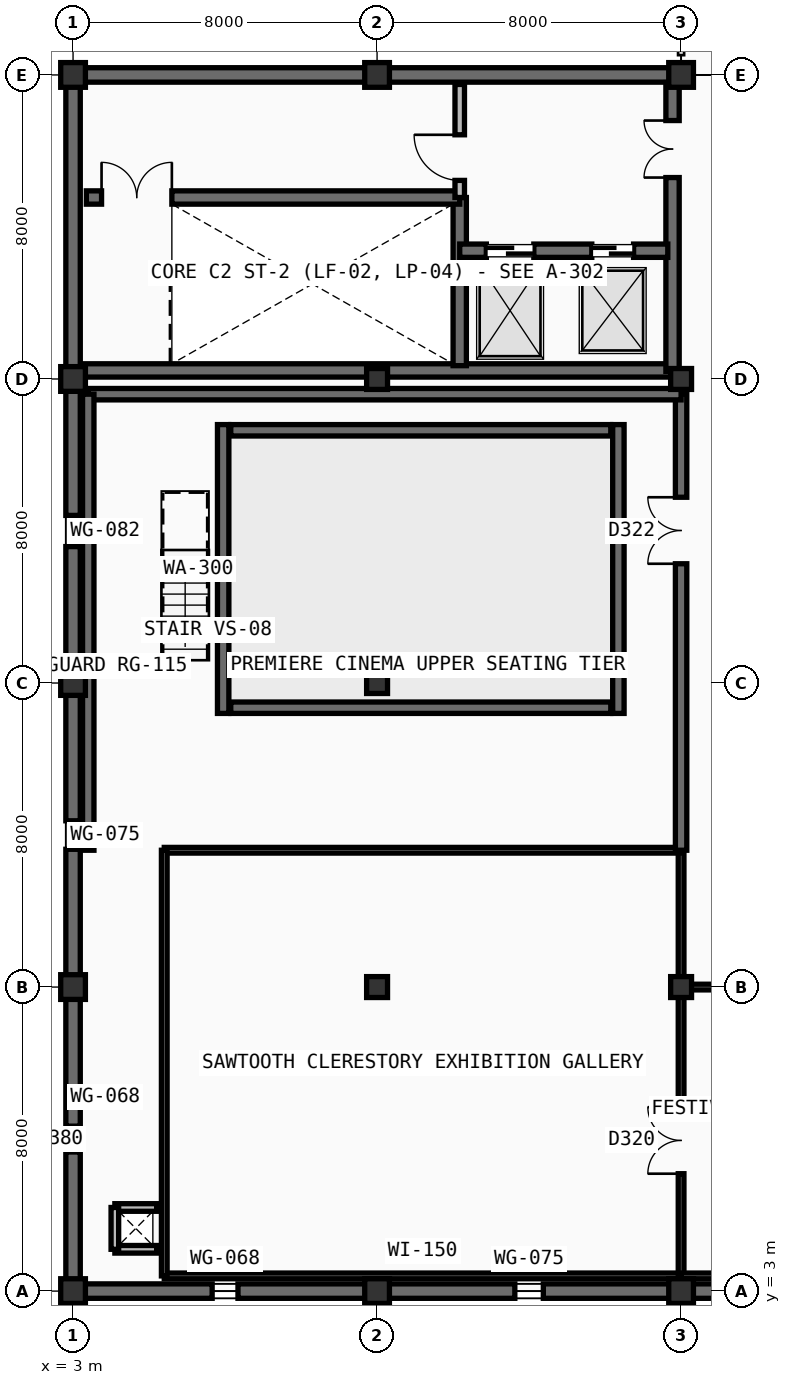
"""IFC4 building model, lengths in metres.
Left out: names, types, materials, properties, quantities, classifications, styles, units other than length and angle.
Written with IfcOpenShell. Run it as: python <this file> out.ifc"""

import sys

from ifc_helpers import new_model, si_unit, direction, frame, frame_2d, origin, origin_2d, place, context, subcontext, project, spatial, polyline, rectangle, outline, extrude, element, fill, save


model = new_model("IFC4")
c1 = context("Model", 3, precision=1e-05, world=origin(), true_north=direction((0.0, 1.0)))
c2 = subcontext(c1, "Body", "Model", "MODEL_VIEW")
j1 = project(units=[si_unit("LENGTHUNIT", "METRE"), si_unit("PLANEANGLEUNIT", "RADIAN")], contexts=[c1])
p1 = place(None, origin())
s1 = spatial("IfcSite", under=j1, at=p1, CompositionType="ELEMENT")
p2 = place(p1, origin())
s2 = spatial("IfcBuilding", under=s1, at=p2, CompositionType="ELEMENT")
p3 = place(p2, frame((0.0, 0.0, 27.9)))
s3 = spatial("IfcBuildingStorey", under=s2, at=p3, CompositionType="ELEMENT", Elevation=27.9)
for number, where, z_axis, x_axis in (
    (1, (3.0, 3.0, 0.0), (0.0, 0.0, 1.0), (1.0, 0.0, 0.0)),
    (2, (3.0, 11.0, 0.0), (0.0, 0.0, 1.0), (1.0, 0.0, 0.0)),
    (3, (3.0, 19.0, 0.0), (0.0, 0.0, 1.0), (1.0, 0.0, 0.0)),
    (4, (3.0, 27.0, 0.0), (0.0, 0.0, 1.0), (1.0, 0.0, 0.0)),
    (5, (3.0, 35.0, 0.0), (0.0, 0.0, 1.0), (1.0, 0.0, 0.0)),
    (6, (11.0, 3.0, 0.0), (0.0, 0.0, 1.0), (1.0, 0.0, 0.0)),
):
    element("IfcColumn", number, at=place(p3, frame(where, z_axis=z_axis, x_axis=x_axis)), inside=s3, PredefinedType="COLUMN", context=c2, shape_type="SweptSolid", body=[
        extrude(rectangle(XDim=0.65, YDim=0.65, at=origin_2d()), origin(), (0.0, 0.0, 1.0), 4.8),
    ])
for number, where, z_axis, x_axis in (
    (7, (11.0, 11.0, 0.0), (0.0, 0.0, 1.0), (1.0, 0.0, 0.0)),
    (8, (11.0, 19.0, 0.0), (0.0, 0.0, 1.0), (1.0, 0.0, 0.0)),
    (9, (11.0, 27.0, 0.0), (0.0, 0.0, 1.0), (1.0, 0.0, 0.0)),
):
    element("IfcColumn", number, at=place(p3, frame(where, z_axis=z_axis, x_axis=x_axis)), inside=s3, PredefinedType="COLUMN", context=c2, shape_type="SweptSolid", body=[
        extrude(rectangle(XDim=0.55, YDim=0.55, at=origin_2d()), origin(), (0.0, 0.0, 1.0), 4.8),
    ])
for number, where, z_axis, x_axis in (
    (10, (11.0, 35.0, 0.0), (0.0, 0.0, 1.0), (1.0, 0.0, 0.0)),
    (11, (19.0, 3.0, 0.0), (0.0, 0.0, 1.0), (1.0, 0.0, 0.0)),
):
    element("IfcColumn", number, at=place(p3, frame(where, z_axis=z_axis, x_axis=x_axis)), inside=s3, PredefinedType="COLUMN", context=c2, shape_type="SweptSolid", body=[
        extrude(rectangle(XDim=0.65, YDim=0.65, at=origin_2d()), origin(), (0.0, 0.0, 1.0), 4.8),
    ])
for number, where, z_axis, x_axis in (
    (12, (19.0, 11.0, 0.0), (0.0, 0.0, 1.0), (1.0, 0.0, 0.0)),
    (13, (19.0, 27.0, 0.0), (0.0, 0.0, 1.0), (1.0, 0.0, 0.0)),
):
    element("IfcColumn", number, at=place(p3, frame(where, z_axis=z_axis, x_axis=x_axis)), inside=s3, PredefinedType="COLUMN", context=c2, shape_type="SweptSolid", body=[
        extrude(rectangle(XDim=0.55, YDim=0.55, at=origin_2d()), origin(), (0.0, 0.0, 1.0), 4.8),
    ])
p4 = place(p3, frame((19.0, 35.0, 0.0), z_axis=(0.0, 0.0, 1.0), x_axis=(1.0, 0.0, 0.0)))
e14 = element("IfcColumn", 14, at=p4, inside=s3, PredefinedType="COLUMN", context=c2, shape_type="SweptSolid", body=[
    extrude(rectangle(XDim=0.65, YDim=0.65, at=origin_2d()), origin(), (0.0, 0.0, 1.0), 4.8),
])
for number, where, z_axis, x_axis in (
    (15, (6.95, 18.2, 0.0), (0.0, 0.0, 1.0), (0.0, 1.0, 0.0)),
    (16, (17.35, 18.2, 0.0), (0.0, 0.0, 1.0), (0.0, 1.0, 0.0)),
):
    element("IfcWall", number, at=place(p3, frame(where, z_axis=z_axis, x_axis=x_axis)), inside=s3, PredefinedType="SHEAR", context=c2, shape_type="SweptSolid", body=[
        extrude(outline(polyline([(0.0, 0.0), (7.6, 0.0), (7.6, 2.02), (0.0, 0.52), (0.0, 0.0)])), frame((0.0, 0.15, 0.0), z_axis=(0.0, -1.0, 0.0), x_axis=(1.0, 0.0, 0.0)), (0.0, 0.0, 1.0), 0.3),
    ])
p5 = place(p3, frame((7.15, 25.65, 0.0), z_axis=(0.0, 0.0, 1.0), x_axis=(1.0, 0.0, 0.0)))
e17 = element("IfcWall", 17, at=p5, inside=s3, PredefinedType="SHEAR", context=c2, shape_type="SweptSolid", body=[
    extrude(rectangle(XDim=10.0, YDim=0.3, at=frame_2d((5.0, 0.0))), origin(), (0.0, 0.0, 1.0), 2.02),
])
p6 = place(p3, frame((7.15, 18.35, 0.0), z_axis=(0.0, 0.0, 1.0), x_axis=(1.0, 0.0, 0.0)))
e18 = element("IfcWall", 18, at=p6, inside=s3, PredefinedType="SHEAR", context=c2, shape_type="SweptSolid", body=[
    extrude(rectangle(XDim=10.0, YDim=0.3, at=frame_2d((5.0, 0.0))), origin(), (0.0, 0.0, 1.0), 0.52),
])
p7 = place(p3, frame((3.0, 3.0, 0.0), z_axis=(0.0, 0.0, 1.0), x_axis=(0.0, 1.0, 0.0)))
e19 = element("IfcWall", 19, at=p7, inside=s3, PredefinedType="SOLIDWALL", context=c2, shape_type="SweptSolid", body=[
    extrude(rectangle(XDim=8.0, YDim=0.38, at=frame_2d((4.0, 0.0))), origin(), (0.0, 0.0, 1.0), 4.8),
])
p8 = place(p7, frame((3.66, 0.0, 1.05)))
e20 = element("IfcOpeningElement", 20, at=p8, cuts=e19, PredefinedType="OPENING", context=c2, shape_type="SweptSolid", body=[
    extrude(rectangle(XDim=0.68, YDim=1.15, at=frame_2d((0.34, 0.575))), frame((0.0, 0.2, 0.0), z_axis=(0.0, -1.0, 0.0), x_axis=(1.0, 0.0, 0.0)), (0.0, 0.0, 1.0), 0.4),
])
p9 = place(p3, frame((3.0, 11.0, 0.0), z_axis=(0.0, 0.0, 1.0), x_axis=(0.0, 1.0, 0.0)))
e21 = element("IfcWall", 21, at=p9, inside=s3, PredefinedType="SOLIDWALL", context=c2, shape_type="SweptSolid", body=[
    extrude(rectangle(XDim=8.0, YDim=0.38, at=frame_2d((4.0, 0.0))), origin(), (0.0, 0.0, 1.0), 4.8),
])
p10 = place(p9, frame((3.625, 0.0, 1.05)))
e22 = element("IfcOpeningElement", 22, at=p10, cuts=e21, PredefinedType="OPENING", context=c2, shape_type="SweptSolid", body=[
    extrude(rectangle(XDim=0.75, YDim=1.3, at=frame_2d((0.375, 0.65))), frame((0.0, 0.2, 0.0), z_axis=(0.0, -1.0, 0.0), x_axis=(1.0, 0.0, 0.0)), (0.0, 0.0, 1.0), 0.4),
])
p11 = place(p3, frame((3.0, 19.0, 0.0), z_axis=(0.0, 0.0, 1.0), x_axis=(0.0, 1.0, 0.0)))
e23 = element("IfcWall", 23, at=p11, inside=s3, PredefinedType="SOLIDWALL", context=c2, shape_type="SweptSolid", body=[
    extrude(rectangle(XDim=8.0, YDim=0.38, at=frame_2d((4.0, 0.0))), origin(), (0.0, 0.0, 1.0), 4.8),
])
p12 = place(p11, frame((3.59, 0.0, 1.05)))
e24 = element("IfcOpeningElement", 24, at=p12, cuts=e23, PredefinedType="OPENING", context=c2, shape_type="SweptSolid", body=[
    extrude(rectangle(XDim=0.82, YDim=1.38, at=frame_2d((0.41, 0.69))), frame((0.0, 0.2, 0.0), z_axis=(0.0, -1.0, 0.0), x_axis=(1.0, 0.0, 0.0)), (0.0, 0.0, 1.0), 0.4),
])
for number, where, z_axis, x_axis in (
    (25, (3.0, 27.0, 0.0), (0.0, 0.0, 1.0), (0.0, 1.0, 0.0)),
    (26, (3.0, 35.0, 0.0), (0.0, 0.0, 1.0), (1.0, 0.0, 0.0)),
    (27, (11.0, 35.0, 0.0), (0.0, 0.0, 1.0), (1.0, 0.0, 0.0)),
):
    element("IfcWall", number, at=place(p3, frame(where, z_axis=z_axis, x_axis=x_axis)), inside=s3, PredefinedType="SOLIDWALL", context=c2, shape_type="SweptSolid", body=[
        extrude(rectangle(XDim=8.0, YDim=0.38, at=frame_2d((4.0, 0.0))), origin(), (0.0, 0.0, 1.0), 4.8),
    ])
p13 = place(p3, frame((27.0, 3.0, 0.0), z_axis=(0.0, 0.0, 1.0), x_axis=(-1.0, 0.0, 0.0)))
e28 = element("IfcWall", 28, at=p13, inside=s3, PredefinedType="SOLIDWALL", context=c2, shape_type="SweptSolid", body=[
    extrude(rectangle(XDim=8.0, YDim=0.38, at=frame_2d((4.0, 0.0))), origin(), (0.0, 0.0, 1.0), 4.8),
])
p14 = place(p13, frame((3.66, 0.0, 1.05)))
e29 = element("IfcOpeningElement", 29, at=p14, cuts=e28, PredefinedType="OPENING", context=c2, shape_type="SweptSolid", body=[
    extrude(rectangle(XDim=0.68, YDim=1.15, at=frame_2d((0.34, 0.575))), frame((0.0, 0.2, 0.0), z_axis=(0.0, -1.0, 0.0), x_axis=(1.0, 0.0, 0.0)), (0.0, 0.0, 1.0), 0.4),
])
p15 = place(p3, frame((19.0, 3.0, 0.0), z_axis=(0.0, 0.0, 1.0), x_axis=(-1.0, 0.0, 0.0)))
e30 = element("IfcWall", 30, at=p15, inside=s3, PredefinedType="SOLIDWALL", context=c2, shape_type="SweptSolid", body=[
    extrude(rectangle(XDim=8.0, YDim=0.38, at=frame_2d((4.0, 0.0))), origin(), (0.0, 0.0, 1.0), 4.8),
])
p16 = place(p15, frame((3.625, 0.0, 1.05)))
e31 = element("IfcOpeningElement", 31, at=p16, cuts=e30, PredefinedType="OPENING", context=c2, shape_type="SweptSolid", body=[
    extrude(rectangle(XDim=0.75, YDim=1.3, at=frame_2d((0.375, 0.65))), frame((0.0, 0.2, 0.0), z_axis=(0.0, -1.0, 0.0), x_axis=(1.0, 0.0, 0.0)), (0.0, 0.0, 1.0), 0.4),
])
p17 = place(p3, frame((11.0, 3.0, 0.0), z_axis=(0.0, 0.0, 1.0), x_axis=(-1.0, 0.0, 0.0)))
e32 = element("IfcWall", 32, at=p17, inside=s3, PredefinedType="SOLIDWALL", context=c2, shape_type="SweptSolid", body=[
    extrude(rectangle(XDim=8.0, YDim=0.38, at=frame_2d((4.0, 0.0))), origin(), (0.0, 0.0, 1.0), 4.8),
])
p18 = place(p17, frame((3.66, 0.0, 1.05)))
e33 = element("IfcOpeningElement", 33, at=p18, cuts=e32, PredefinedType="OPENING", context=c2, shape_type="SweptSolid", body=[
    extrude(rectangle(XDim=0.68, YDim=1.15, at=frame_2d((0.34, 0.575))), frame((0.0, 0.2, 0.0), z_axis=(0.0, -1.0, 0.0), x_axis=(1.0, 0.0, 0.0)), (0.0, 0.0, 1.0), 0.4),
])
p19 = place(p3, frame((3.2, 27.225, 0.0), z_axis=(0.0, 0.0, 1.0), x_axis=(1.0, 0.0, 0.0)))
e34 = element("IfcWall", 34, at=p19, inside=s3, PredefinedType="SHEAR", context=c2, shape_type="SweptSolid", body=[
    extrude(rectangle(XDim=15.6, YDim=0.35, at=frame_2d((7.8, 0.0))), origin(), (0.0, 0.0, 1.0), 4.54),
])
p20 = place(p3, frame((13.175, 27.35, 0.0), z_axis=(0.0, 0.0, 1.0), x_axis=(0.0, 1.0, 0.0)))
e35 = element("IfcWall", 35, at=p20, inside=s3, PredefinedType="SHEAR", context=c2, shape_type="SweptSolid", body=[
    extrude(rectangle(XDim=4.425, YDim=0.35, at=frame_2d((2.212, 0.0))), origin(), (0.0, 0.0, 1.0), 4.54),
])
p21 = place(p3, frame((18.775, 27.2, 0.0), z_axis=(0.0, 0.0, 1.0), x_axis=(0.0, 1.0, 0.0)))
e36 = element("IfcWall", 36, at=p21, inside=s3, PredefinedType="SHEAR", context=c2, shape_type="SweptSolid", body=[
    extrude(rectangle(XDim=7.6, YDim=0.35, at=frame_2d((3.8, 0.0))), origin(), (0.0, 0.0, 1.0), 4.54),
])
p22 = place(p21, frame((5.1, 0.0, 0.0)))
e37 = element("IfcOpeningElement", 37, at=p22, cuts=e36, PredefinedType="OPENING", context=c2, shape_type="SweptSolid", body=[
    extrude(rectangle(XDim=1.5, YDim=2.2, at=frame_2d((0.75, 1.1))), frame((0.0, 0.185, 0.0), z_axis=(0.0, -1.0, 0.0), x_axis=(1.0, 0.0, 0.0)), (0.0, 0.0, 1.0), 0.37),
])
p23 = place(p3, frame((3.35, 31.775, 0.0), z_axis=(0.0, 0.0, 1.0), x_axis=(1.0, 0.0, 0.0)))
e38 = element("IfcWall", 38, at=p23, inside=s3, PredefinedType="SHEAR", context=c2, shape_type="SweptSolid", body=[
    extrude(rectangle(XDim=9.825, YDim=0.35, at=frame_2d((4.913, 0.0))), origin(), (0.0, 0.0, 1.0), 4.54),
])
p24 = place(p23, frame((0.4, 0.0, 0.0)))
e39 = element("IfcOpeningElement", 39, at=p24, cuts=e38, PredefinedType="OPENING", context=c2, shape_type="SweptSolid", body=[
    extrude(rectangle(XDim=1.85, YDim=2.25, at=frame_2d((0.925, 1.125))), frame((0.0, 0.185, 0.0), z_axis=(0.0, -1.0, 0.0), x_axis=(1.0, 0.0, 0.0)), (0.0, 0.0, 1.0), 0.37),
])
p25 = place(p3, frame((13.175, 30.375, 0.0), z_axis=(0.0, 0.0, 1.0), x_axis=(1.0, 0.0, 0.0)))
e40 = element("IfcWall", 40, at=p25, inside=s3, PredefinedType="SHEAR", context=c2, shape_type="SweptSolid", body=[
    extrude(rectangle(XDim=5.475, YDim=0.35, at=frame_2d((2.737, 0.0))), origin(), (0.0, 0.0, 1.0), 4.54),
])
p26 = place(p25, frame((0.7, 0.0, 0.0)))
e41 = element("IfcOpeningElement", 41, at=p26, cuts=e40, PredefinedType="OPENING", context=c2, shape_type="SweptSolid", body=[
    extrude(rectangle(XDim=1.25, YDim=2.25, at=frame_2d((0.625, 1.125))), frame((0.0, 0.185, 0.0), z_axis=(0.0, -1.0, 0.0), x_axis=(1.0, 0.0, 0.0)), (0.0, 0.0, 1.0), 0.37),
])
p27 = place(p25, frame((3.475, 0.0, 0.0)))
e42 = element("IfcOpeningElement", 42, at=p27, cuts=e40, PredefinedType="OPENING", context=c2, shape_type="SweptSolid", body=[
    extrude(rectangle(XDim=1.1, YDim=2.2, at=frame_2d((0.55, 1.1))), frame((0.0, 0.185, 0.0), z_axis=(0.0, -1.0, 0.0), x_axis=(1.0, 0.0, 0.0)), (0.0, 0.0, 1.0), 0.37),
])
p28 = place(p3, frame((13.175, 31.775, 0.0), z_axis=(0.0, 0.0, 1.0), x_axis=(0.0, 1.0, 0.0)))
e43 = element("IfcWall", 43, at=p28, inside=s3, PredefinedType="PARTITIONING", context=c2, shape_type="SweptSolid", body=[
    extrude(rectangle(XDim=2.975, YDim=0.25, at=frame_2d((1.488, 0.0))), origin(), (0.0, 0.0, 1.0), 4.54),
])
p29 = place(p28, frame((0.45, 0.0, 0.0)))
e44 = element("IfcOpeningElement", 44, at=p29, cuts=e43, PredefinedType="OPENING", context=c2, shape_type="SweptSolid", body=[
    extrude(rectangle(XDim=1.2, YDim=2.2, at=frame_2d((0.6, 1.1))), frame((0.0, 0.135, 0.0), z_axis=(0.0, -1.0, 0.0), x_axis=(1.0, 0.0, 0.0)), (0.0, 0.0, 1.0), 0.27),
])
p30 = place(p3, frame((5.4, 3.4, 0.0), z_axis=(0.0, 0.0, 1.0), x_axis=(1.0, 0.0, 0.0)))
e45 = element("IfcWall", 45, at=p30, inside=s3, PredefinedType="PARTITIONING", context=c2, shape_type="SweptSolid", body=[
    extrude(rectangle(XDim=13.6, YDim=0.15, at=frame_2d((6.8, 0.0))), origin(), (0.0, 0.0, 1.0), 4.54),
])
p31 = place(p3, frame((19.0, 3.4, 0.0), z_axis=(0.0, 0.0, 1.0), x_axis=(0.0, 1.0, 0.0)))
e46 = element("IfcWall", 46, at=p31, inside=s3, PredefinedType="PARTITIONING", context=c2, shape_type="SweptSolid", body=[
    extrude(rectangle(XDim=11.2, YDim=0.15, at=frame_2d((5.6, 0.0))), origin(), (0.0, 0.0, 1.0), 4.54),
])
p32 = place(p31, frame((2.689, 0.0, 0.0)))
e47 = element("IfcOpeningElement", 47, at=p32, cuts=e46, PredefinedType="OPENING", context=c2, shape_type="SweptSolid", body=[
    extrude(rectangle(XDim=1.75, YDim=2.3, at=frame_2d((0.875, 1.15))), frame((0.0, 0.085, 0.0), z_axis=(0.0, -1.0, 0.0), x_axis=(1.0, 0.0, 0.0)), (0.0, 0.0, 1.0), 0.17),
])
p33 = place(p3, frame((5.4, 14.6, 0.0), z_axis=(0.0, 0.0, 1.0), x_axis=(1.0, 0.0, 0.0)))
e48 = element("IfcWall", 48, at=p33, inside=s3, PredefinedType="PARTITIONING", context=c2, shape_type="SweptSolid", body=[
    extrude(rectangle(XDim=13.6, YDim=0.15, at=frame_2d((6.8, 0.0))), origin(), (0.0, 0.0, 1.0), 4.54),
])
p34 = place(p3, frame((5.4, 3.4, 0.0), z_axis=(0.0, 0.0, 1.0), x_axis=(0.0, 1.0, 0.0)))
e49 = element("IfcWall", 49, at=p34, inside=s3, PredefinedType="PARTITIONING", context=c2, shape_type="SweptSolid", body=[
    extrude(rectangle(XDim=11.2, YDim=0.15, at=frame_2d((5.6, 0.0))), origin(), (0.0, 0.0, 1.0), 4.54),
])
p35 = place(p3, frame((19.0, 3.4, 0.0), z_axis=(0.0, 0.0, 1.0), x_axis=(1.0, 0.0, 0.0)))
e50 = element("IfcWall", 50, at=p35, inside=s3, PredefinedType="PARTITIONING", context=c2, shape_type="SweptSolid", body=[
    extrude(rectangle(XDim=7.6, YDim=0.15, at=frame_2d((3.8, 0.0))), origin(), (0.0, 0.0, 1.0), 4.54),
])
p36 = place(p3, frame((19.0, 11.0, 0.0), z_axis=(0.0, 0.0, 1.0), x_axis=(1.0, 0.0, 0.0)))
e51 = element("IfcWall", 51, at=p36, inside=s3, PredefinedType="PARTITIONING", context=c2, shape_type="SweptSolid", body=[
    extrude(rectangle(XDim=7.6, YDim=0.15, at=frame_2d((3.8, 0.0))), origin(), (0.0, 0.0, 1.0), 4.54),
])
p37 = place(p36, frame((3.544, 0.0, 0.0)))
e52 = element("IfcOpeningElement", 52, at=p37, cuts=e51, PredefinedType="OPENING", context=c2, shape_type="SweptSolid", body=[
    extrude(rectangle(XDim=0.92, YDim=2.1, at=frame_2d((0.46, 1.05))), frame((0.0, 0.085, 0.0), z_axis=(0.0, -1.0, 0.0), x_axis=(1.0, 0.0, 0.0)), (0.0, 0.0, 1.0), 0.17),
])
p38 = place(p3, frame((19.0, 14.6, 0.0), z_axis=(0.0, 0.0, 1.0), x_axis=(0.0, 1.0, 0.0)))
e53 = element("IfcWall", 53, at=p38, inside=s3, PredefinedType="SHEAR", context=c2, shape_type="SweptSolid", body=[
    extrude(rectangle(XDim=12.0, YDim=0.3, at=frame_2d((6.0, 0.0))), origin(), (0.0, 0.0, 1.0), 4.54),
])
p39 = place(p38, frame((7.538, 0.0, 0.0)))
e54 = element("IfcOpeningElement", 54, at=p39, cuts=e53, PredefinedType="OPENING", context=c2, shape_type="SweptSolid", body=[
    extrude(rectangle(XDim=1.75, YDim=2.28, at=frame_2d((0.875, 1.14))), frame((0.0, 0.16, 0.0), z_axis=(0.0, -1.0, 0.0), x_axis=(1.0, 0.0, 0.0)), (0.0, 0.0, 1.0), 0.32),
])
p40 = place(p3, frame((3.4, 26.6, 0.0), z_axis=(0.0, 0.0, 1.0), x_axis=(1.0, 0.0, 0.0)))
e55 = element("IfcWall", 55, at=p40, inside=s3, PredefinedType="SHEAR", context=c2, shape_type="SweptSolid", body=[
    extrude(rectangle(XDim=15.6, YDim=0.3, at=frame_2d((7.8, 0.0))), origin(), (0.0, 0.0, 1.0), 4.54),
])
p41 = place(p3, frame((3.4, 14.6, 0.0), z_axis=(0.0, 0.0, 1.0), x_axis=(0.0, 1.0, 0.0)))
e56 = element("IfcWall", 56, at=p41, inside=s3, PredefinedType="SHEAR", context=c2, shape_type="SweptSolid", body=[
    extrude(rectangle(XDim=12.0, YDim=0.3, at=frame_2d((6.0, 0.0))), origin(), (0.0, 0.0, 1.0), 4.54),
])
for number, where, z_axis, x_axis in (
    (57, (4.1, 4.1, 0.0), (0.0, 0.0, 1.0), (1.0, 0.0, 0.0)),
    (58, (4.1, 5.2, 0.0), (0.0, 0.0, 1.0), (1.0, 0.0, 0.0)),
    (59, (4.1, 4.1, 0.0), (0.0, 0.0, 1.0), (0.0, 1.0, 0.0)),
):
    element("IfcWall", number, at=place(p3, frame(where, z_axis=z_axis, x_axis=x_axis)), inside=s3, PredefinedType="PARTITIONING", context=c2, shape_type="SweptSolid", body=[
        extrude(rectangle(XDim=1.1, YDim=0.2, at=frame_2d((0.55, 0.0))), origin(), (0.0, 0.0, 1.0), 4.54),
    ])
p42 = place(p8, origin())
e60 = element("IfcWindow", 60, at=p42, inside=s3, PartitioningType="SINGLE_PANEL", PredefinedType="WINDOW", context=c2, shape_type="SweptSolid", body=[
    extrude(rectangle(XDim=0.68, YDim=1.15, at=frame_2d((0.34, 0.575))), frame((0.0, 0.03, 0.0), z_axis=(0.0, -1.0, 0.0), x_axis=(1.0, 0.0, 0.0)), (0.0, 0.0, 1.0), 0.06),
])
fill(e20, e60)
p43 = place(p10, origin())
e61 = element("IfcWindow", 61, at=p43, inside=s3, PartitioningType="SINGLE_PANEL", PredefinedType="WINDOW", context=c2, shape_type="SweptSolid", body=[
    extrude(rectangle(XDim=0.75, YDim=1.3, at=frame_2d((0.375, 0.65))), frame((0.0, 0.03, 0.0), z_axis=(0.0, -1.0, 0.0), x_axis=(1.0, 0.0, 0.0)), (0.0, 0.0, 1.0), 0.06),
])
fill(e22, e61)
p44 = place(p12, origin())
e62 = element("IfcWindow", 62, at=p44, inside=s3, PartitioningType="SINGLE_PANEL", PredefinedType="WINDOW", context=c2, shape_type="SweptSolid", body=[
    extrude(rectangle(XDim=0.82, YDim=1.38, at=frame_2d((0.41, 0.69))), frame((0.0, 0.03, 0.0), z_axis=(0.0, -1.0, 0.0), x_axis=(1.0, 0.0, 0.0)), (0.0, 0.0, 1.0), 0.06),
])
fill(e24, e62)
p45 = place(p16, origin())
e63 = element("IfcWindow", 63, at=p45, inside=s3, PartitioningType="SINGLE_PANEL", PredefinedType="WINDOW", context=c2, shape_type="SweptSolid", body=[
    extrude(rectangle(XDim=0.75, YDim=1.3, at=frame_2d((0.375, 0.65))), frame((0.0, 0.03, 0.0), z_axis=(0.0, -1.0, 0.0), x_axis=(1.0, 0.0, 0.0)), (0.0, 0.0, 1.0), 0.06),
])
fill(e31, e63)
p46 = place(p18, origin())
e64 = element("IfcWindow", 64, at=p46, inside=s3, PartitioningType="SINGLE_PANEL", PredefinedType="WINDOW", context=c2, shape_type="SweptSolid", body=[
    extrude(rectangle(XDim=0.68, YDim=1.15, at=frame_2d((0.34, 0.575))), frame((0.0, 0.03, 0.0), z_axis=(0.0, -1.0, 0.0), x_axis=(1.0, 0.0, 0.0)), (0.0, 0.0, 1.0), 0.06),
])
fill(e33, e64)
p47 = place(p24, origin())
e65 = element("IfcDoor", 65, at=p47, inside=s3, OperationType="DOUBLE_DOOR_SINGLE_SWING", PredefinedType="DOOR", context=c2, shape_type="SweptSolid", body=[
    extrude(rectangle(XDim=1.85, YDim=2.25, at=frame_2d((0.925, 1.125))), frame((0.0, 0.025, 0.0), z_axis=(0.0, -1.0, 0.0), x_axis=(1.0, 0.0, 0.0)), (0.0, 0.0, 1.0), 0.05),
])
fill(e39, e65)
p48 = place(p26, origin())
e66 = element("IfcDoor", 66, at=p48, inside=s3, OperationType="DOUBLE_DOOR_SLIDING", PredefinedType="DOOR", context=c2, shape_type="SweptSolid", body=[
    extrude(rectangle(XDim=1.25, YDim=2.25, at=frame_2d((0.625, 1.125))), frame((0.0, 0.025, 0.0), z_axis=(0.0, -1.0, 0.0), x_axis=(1.0, 0.0, 0.0)), (0.0, 0.0, 1.0), 0.05),
])
fill(e41, e66)
p49 = place(p27, origin())
e67 = element("IfcDoor", 67, at=p49, inside=s3, OperationType="DOUBLE_DOOR_SLIDING", PredefinedType="DOOR", context=c2, shape_type="SweptSolid", body=[
    extrude(rectangle(XDim=1.1, YDim=2.2, at=frame_2d((0.55, 1.1))), frame((0.0, 0.025, 0.0), z_axis=(0.0, -1.0, 0.0), x_axis=(1.0, 0.0, 0.0)), (0.0, 0.0, 1.0), 0.05),
])
fill(e42, e67)
p50 = place(p29, origin())
e68 = element("IfcDoor", 68, at=p50, inside=s3, OperationType="SINGLE_SWING_RIGHT", PredefinedType="DOOR", context=c2, shape_type="SweptSolid", body=[
    extrude(rectangle(XDim=1.2, YDim=2.2, at=frame_2d((0.6, 1.1))), frame((0.0, 0.025, 0.0), z_axis=(0.0, -1.0, 0.0), x_axis=(1.0, 0.0, 0.0)), (0.0, 0.0, 1.0), 0.05),
])
fill(e44, e68)
p51 = place(p22, origin())
e69 = element("IfcDoor", 69, at=p51, inside=s3, OperationType="DOUBLE_DOOR_SINGLE_SWING", PredefinedType="DOOR", context=c2, shape_type="SweptSolid", body=[
    extrude(rectangle(XDim=1.5, YDim=2.2, at=frame_2d((0.75, 1.1))), frame((0.0, 0.025, 0.0), z_axis=(0.0, -1.0, 0.0), x_axis=(1.0, 0.0, 0.0)), (0.0, 0.0, 1.0), 0.05),
])
fill(e37, e69)
p52 = place(p32, origin())
e70 = element("IfcDoor", 70, at=p52, inside=s3, OperationType="DOUBLE_DOOR_SINGLE_SWING", PredefinedType="DOOR", context=c2, shape_type="SweptSolid", body=[
    extrude(rectangle(XDim=1.75, YDim=2.3, at=frame_2d((0.875, 1.15))), frame((0.0, 0.025, 0.0), z_axis=(0.0, -1.0, 0.0), x_axis=(1.0, 0.0, 0.0)), (0.0, 0.0, 1.0), 0.05),
])
fill(e47, e70)
p53 = place(p39, origin())
e71 = element("IfcDoor", 71, at=p53, inside=s3, OperationType="DOUBLE_DOOR_SINGLE_SWING", PredefinedType="DOOR", context=c2, shape_type="SweptSolid", body=[
    extrude(rectangle(XDim=1.75, YDim=2.28, at=frame_2d((0.875, 1.14))), frame((0.0, 0.025, 0.0), z_axis=(0.0, -1.0, 0.0), x_axis=(1.0, 0.0, 0.0)), (0.0, 0.0, 1.0), 0.05),
])
fill(e54, e71)
save(model, sys.argv[1])
